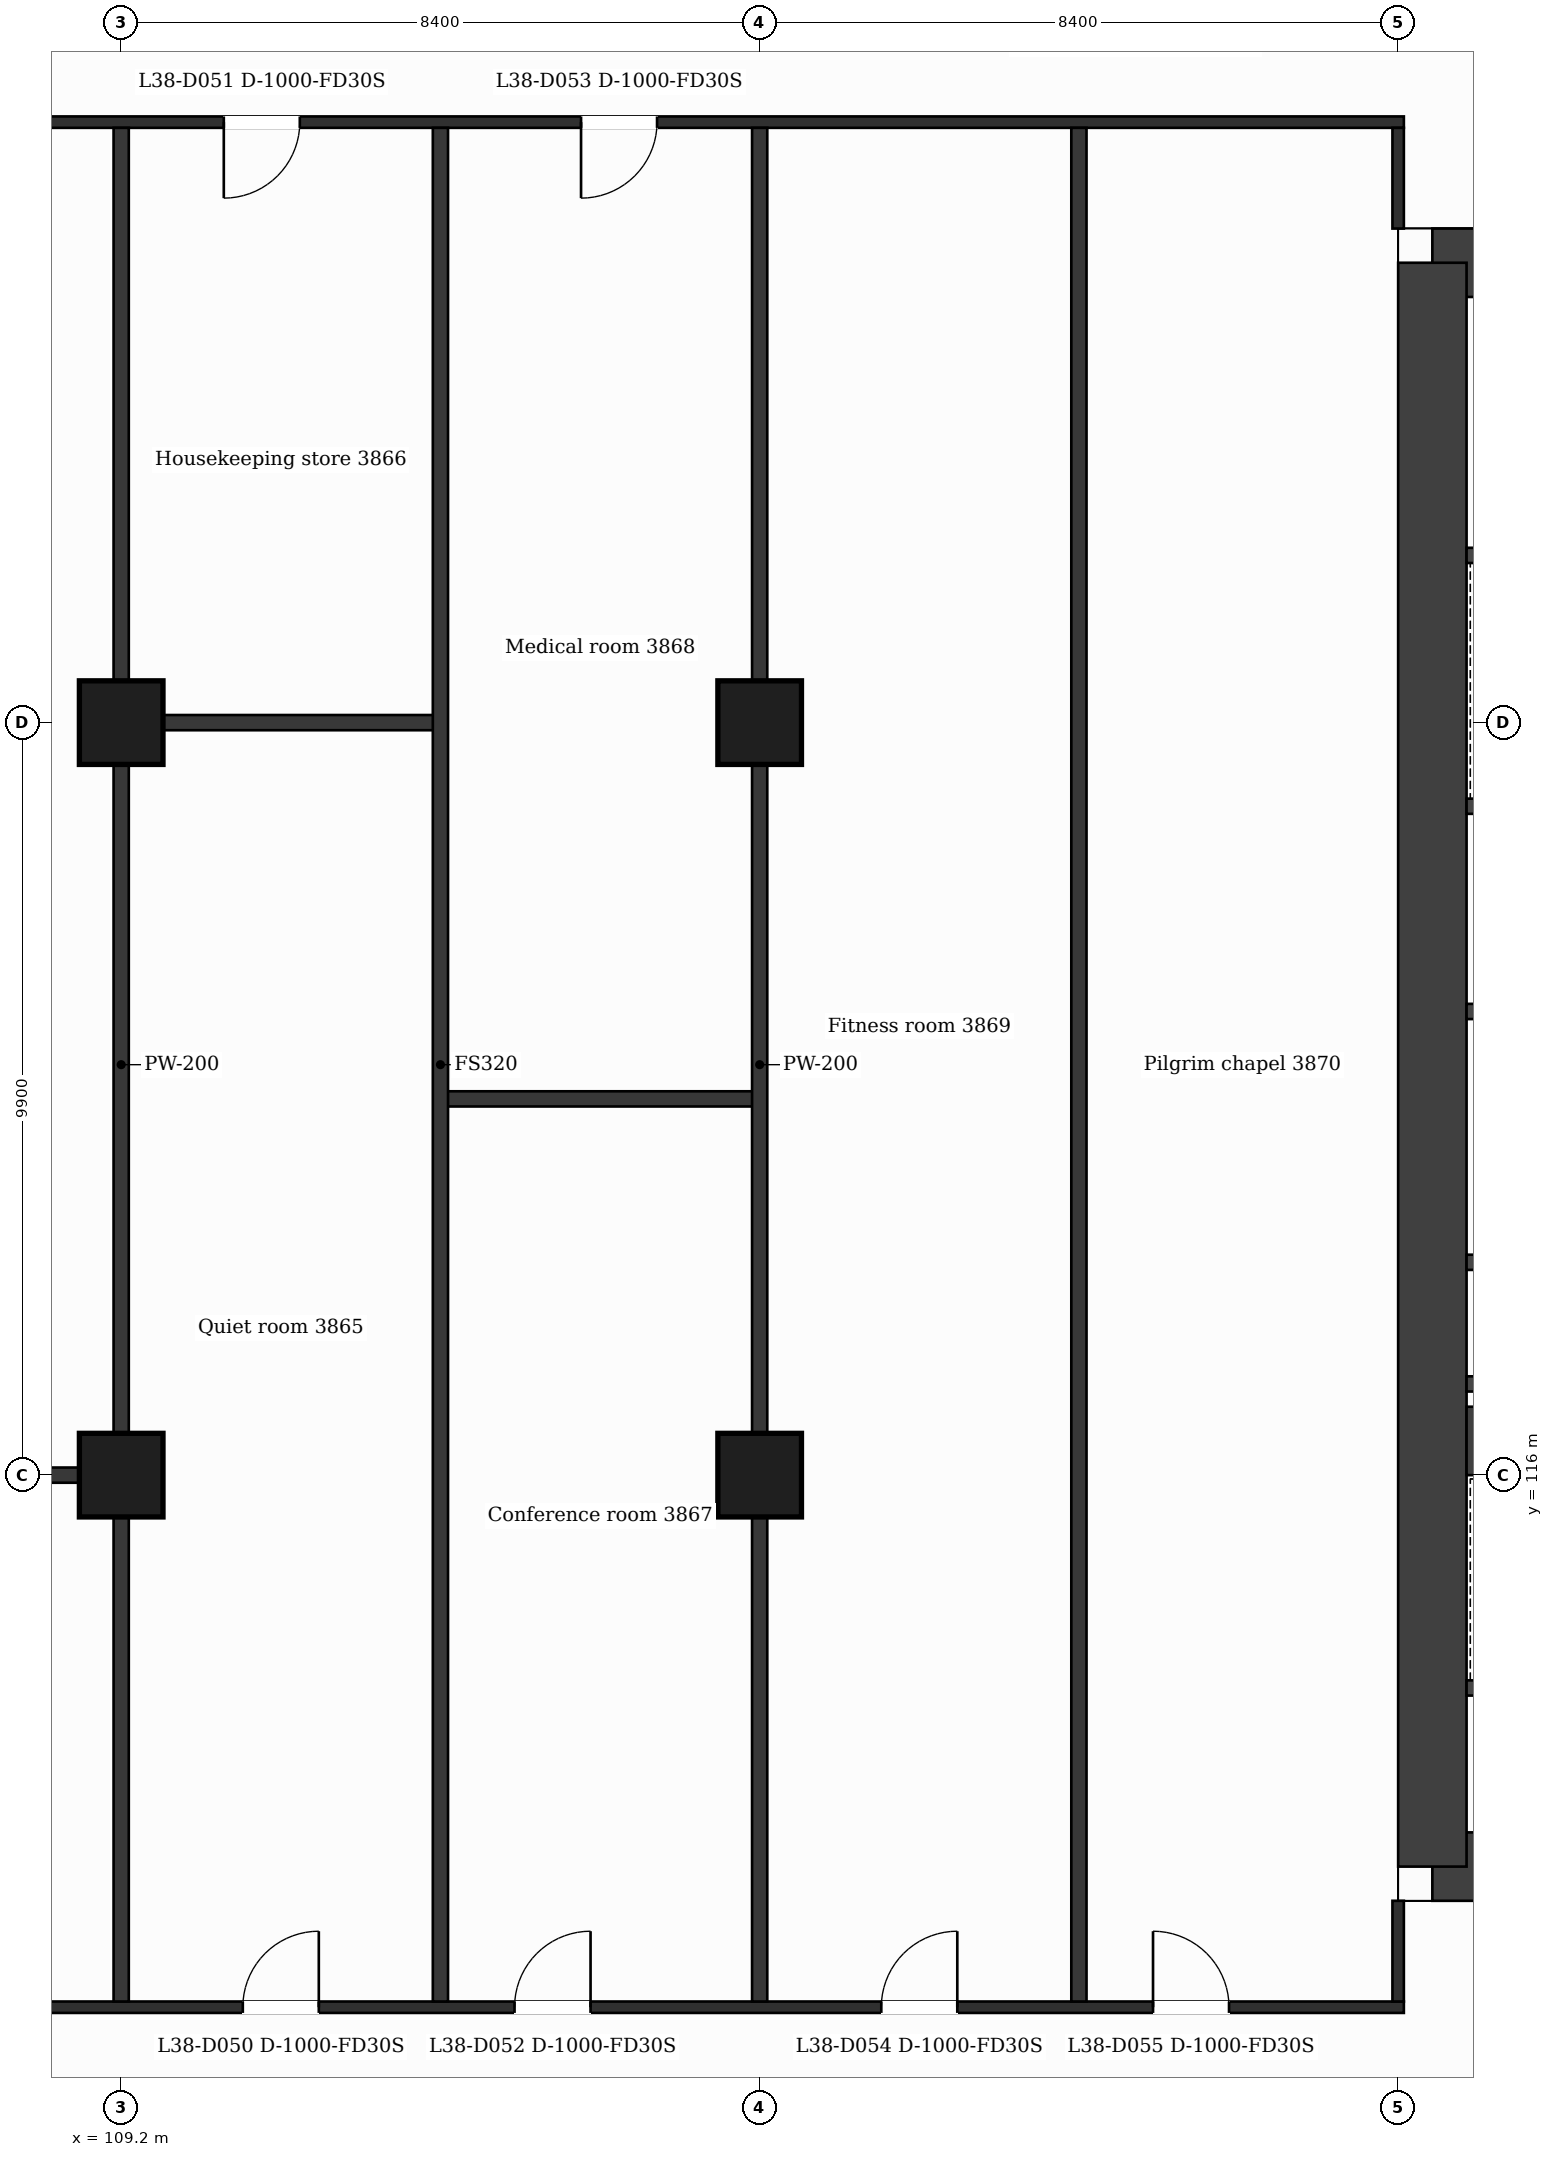
"""IFC4 building model, lengths in metres.
Left out: names, types, materials, properties, quantities, classifications, styles, units other than length and angle.
Written with IfcOpenShell. Run it as: python <this file> out.ifc"""

import sys

from ifc_helpers import new_model, si_unit, direction, frame, frame_2d, origin, origin_2d, place, context, subcontext, project, spatial, rectangle, extrude, element, fill, save


model = new_model("IFC4")
c1 = context("Model", 3, precision=1e-05, world=origin(), true_north=direction((0.0, 1.0)))
c2 = subcontext(c1, "Body", "Model", "MODEL_VIEW")
j1 = project(units=[si_unit("LENGTHUNIT", "METRE"), si_unit("PLANEANGLEUNIT", "RADIAN")], contexts=[c1])
p1 = place(None, origin())
s1 = spatial("IfcSite", under=j1, at=p1, CompositionType="ELEMENT")
p2 = place(p1, origin())
s2 = spatial("IfcBuilding", under=s1, at=p2, CompositionType="ELEMENT")
p3 = place(p2, frame((0.0, 0.0, 162.6)))
s3 = spatial("IfcBuildingStorey", under=s2, at=p3, CompositionType="ELEMENT", Elevation=162.6)
p4 = place(p3, frame((126.45, 131.95, 0.0), z_axis=(0.0, 0.0, 1.0), x_axis=(1.0, 0.0, 0.0)))
e1 = element("IfcWall", 1, at=p4, inside=s3, PredefinedType="SHEAR", context=c2, shape_type="SweptSolid", body=[
    extrude(rectangle(XDim=11.326, YDim=0.9, at=frame_2d((5.663, 0.0))), origin(), (0.0, 0.0, 1.0), 3.7),
])
p5 = place(p4, frame((3.386, 0.0, 0.0)))
e2 = element("IfcOpeningElement", 2, at=p5, cuts=e1, PredefinedType="OPENING", context=c2, shape_type="SweptSolid", body=[
    extrude(rectangle(XDim=1.2, YDim=2.1, at=frame_2d((0.6, 1.05))), frame((0.0, 0.46, 0.0), z_axis=(0.0, -1.0, 0.0), x_axis=(1.0, 0.0, 0.0)), (0.0, 0.0, 1.0), 0.92),
])
p6 = place(p3, frame((140.616, 110.85, 0.0), z_axis=(0.0, 0.0, 1.0), x_axis=(-1.0, 0.0, 0.0)))
e3 = element("IfcWall", 3, at=p6, inside=s3, PredefinedType="SHEAR", context=c2, shape_type="SweptSolid", body=[
    extrude(rectangle(XDim=14.166, YDim=0.9, at=frame_2d((7.083, 0.0))), origin(), (0.0, 0.0, 1.0), 3.7),
])
p7 = place(p6, frame((6.911, 0.0, 0.0)))
e4 = element("IfcOpeningElement", 4, at=p7, cuts=e3, PredefinedType="OPENING", context=c2, shape_type="SweptSolid", body=[
    extrude(rectangle(XDim=1.4, YDim=2.1, at=frame_2d((0.7, 1.05))), frame((0.0, 0.46, 0.0), z_axis=(0.0, -1.0, 0.0), x_axis=(1.0, 0.0, 0.0)), (0.0, 0.0, 1.0), 0.92),
])
p8 = place(p3, frame((126.45, 110.85, 0.0), z_axis=(0.0, 0.0, 1.0), x_axis=(0.0, 1.0, 0.0)))
e5 = element("IfcWall", 5, at=p8, inside=s3, PredefinedType="SHEAR", context=c2, shape_type="SweptSolid", body=[
    extrude(rectangle(XDim=21.1, YDim=0.9, at=frame_2d((10.55, 0.0))), origin(), (0.0, 0.0, 1.0), 3.7),
])
p9 = place(p3, frame((126.9, 116.45, 0.0), z_axis=(0.0, 0.0, 1.0), x_axis=(1.0, 0.0, 0.0)))
e6 = element("IfcWall", 6, at=p9, inside=s3, PredefinedType="SHEAR", context=c2, shape_type="SweptSolid", body=[
    extrude(rectangle(XDim=5.1, YDim=0.9, at=frame_2d((2.55, 0.0))), origin(), (0.0, 0.0, 1.0), 3.7),
])
for number, where, z_axis, x_axis in (
    (7, (109.2, 116.0, 0.0), (0.0, 0.0, 1.0), (1.0, 0.0, 0.0)),
    (8, (117.6, 116.0, 0.0), (0.0, 0.0, 1.0), (1.0, 0.0, 0.0)),
    (9, (109.2, 125.9, 0.0), (0.0, 0.0, 1.0), (1.0, 0.0, 0.0)),
    (10, (117.6, 125.9, 0.0), (0.0, 0.0, 1.0), (1.0, 0.0, 0.0)),
):
    element("IfcColumn", number, at=place(p3, frame(where, z_axis=z_axis, x_axis=x_axis)), inside=s3, PredefinedType="COLUMN", context=c2, shape_type="SweptSolid", body=[
        extrude(rectangle(XDim=1.1, YDim=1.1, at=origin_2d()), origin(), (0.0, 0.0, 1.0), 3.7),
    ])
p10 = place(p3, frame((100.725, 109.0, 0.0), z_axis=(0.0, 0.0, 1.0), x_axis=(1.0, 0.0, 0.0)))
e11 = element("IfcWall", 11, at=p10, inside=s3, PredefinedType="PARTITIONING", context=c2, shape_type="SweptSolid", body=[
    extrude(rectangle(XDim=25.35, YDim=0.15, at=frame_2d((12.675, 0.0))), origin(), (0.0, 0.0, 1.0), 3.38),
])
p11 = place(p10, frame((2.1, 0.0, 0.0)))
e12 = element("IfcOpeningElement", 12, at=p11, cuts=e11, PredefinedType="OPENING", context=c2, shape_type="SweptSolid", body=[
    extrude(rectangle(XDim=1.0, YDim=2.1, at=frame_2d((0.5, 1.05))), frame((0.0, 0.085, 0.0), z_axis=(0.0, -1.0, 0.0), x_axis=(1.0, 0.0, 0.0)), (0.0, 0.0, 1.0), 0.17),
])
p12 = place(p10, frame((10.075, 0.0, 0.0)))
e13 = element("IfcOpeningElement", 13, at=p12, cuts=e11, PredefinedType="OPENING", context=c2, shape_type="SweptSolid", body=[
    extrude(rectangle(XDim=1.0, YDim=2.1, at=frame_2d((0.5, 1.05))), frame((0.0, 0.085, 0.0), z_axis=(0.0, -1.0, 0.0), x_axis=(1.0, 0.0, 0.0)), (0.0, 0.0, 1.0), 0.17),
])
p13 = place(p10, frame((13.65, 0.0, 0.0)))
e14 = element("IfcOpeningElement", 14, at=p13, cuts=e11, PredefinedType="OPENING", context=c2, shape_type="SweptSolid", body=[
    extrude(rectangle(XDim=1.0, YDim=2.1, at=frame_2d((0.5, 1.05))), frame((0.0, 0.085, 0.0), z_axis=(0.0, -1.0, 0.0), x_axis=(1.0, 0.0, 0.0)), (0.0, 0.0, 1.0), 0.17),
])
p14 = place(p10, frame((18.475, 0.0, 0.0)))
e15 = element("IfcOpeningElement", 15, at=p14, cuts=e11, PredefinedType="OPENING", context=c2, shape_type="SweptSolid", body=[
    extrude(rectangle(XDim=1.0, YDim=2.1, at=frame_2d((0.5, 1.05))), frame((0.0, 0.085, 0.0), z_axis=(0.0, -1.0, 0.0), x_axis=(1.0, 0.0, 0.0)), (0.0, 0.0, 1.0), 0.17),
])
p15 = place(p10, frame((22.05, 0.0, 0.0)))
e16 = element("IfcOpeningElement", 16, at=p15, cuts=e11, PredefinedType="OPENING", context=c2, shape_type="SweptSolid", body=[
    extrude(rectangle(XDim=1.0, YDim=2.1, at=frame_2d((0.5, 1.05))), frame((0.0, 0.085, 0.0), z_axis=(0.0, -1.0, 0.0), x_axis=(1.0, 0.0, 0.0)), (0.0, 0.0, 1.0), 0.17),
])
p16 = place(p3, frame((126.9, 113.2, 0.0), z_axis=(0.0, 0.0, 1.0), x_axis=(1.0, 0.0, 0.0)))
e17 = element("IfcWall", 17, at=p16, inside=s3, PredefinedType="PARTITIONING", context=c2, shape_type="SweptSolid", body=[
    extrude(rectangle(XDim=4.773, YDim=0.2, at=frame_2d((2.387, 0.0))), origin(), (0.0, 0.0, 1.0), 3.38),
])
p17 = place(p16, frame((0.565, 0.0, 0.0)))
e18 = element("IfcOpeningElement", 18, at=p17, cuts=e17, PredefinedType="OPENING", context=c2, shape_type="SweptSolid", body=[
    extrude(rectangle(XDim=1.1, YDim=2.1, at=frame_2d((0.55, 1.05))), frame((0.0, 0.11, 0.0), z_axis=(0.0, -1.0, 0.0), x_axis=(1.0, 0.0, 0.0)), (0.0, 0.0, 1.0), 0.22),
])
p18 = place(p3, frame((100.8, 116.0, 0.0), z_axis=(0.0, 0.0, 1.0), x_axis=(1.0, 0.0, 0.0)))
e19 = element("IfcWall", 19, at=p18, inside=s3, PredefinedType="PARTITIONING", context=c2, shape_type="SweptSolid", body=[
    extrude(rectangle(XDim=8.4, YDim=0.2, at=frame_2d((4.2, 0.0))), origin(), (0.0, 0.0, 1.0), 3.38),
])
for number, where, z_axis, x_axis in (
    (20, (126.9, 117.2, 0.0), (0.0, 0.0, 1.0), (1.0, 0.0, 0.0)),
    (21, (126.9, 118.8, 0.0), (0.0, 0.0, 1.0), (1.0, 0.0, 0.0)),
):
    element("IfcWall", number, at=place(p3, frame(where, z_axis=z_axis, x_axis=x_axis)), inside=s3, PredefinedType="PARTITIONING", context=c2, shape_type="SweptSolid", body=[
        extrude(rectangle(XDim=4.673, YDim=0.2, at=frame_2d((2.336, 0.0))), origin(), (0.0, 0.0, 1.0), 3.38),
    ])
p19 = place(p3, frame((113.4, 120.95, 0.0), z_axis=(0.0, 0.0, 1.0), x_axis=(1.0, 0.0, 0.0)))
e22 = element("IfcWall", 22, at=p19, inside=s3, PredefinedType="PARTITIONING", context=c2, shape_type="SweptSolid", body=[
    extrude(rectangle(XDim=4.2, YDim=0.2, at=frame_2d((2.1, 0.0))), origin(), (0.0, 0.0, 1.0), 3.38),
])
p20 = place(p3, frame((126.9, 122.1, 0.0), z_axis=(0.0, 0.0, 1.0), x_axis=(1.0, 0.0, 0.0)))
e23 = element("IfcWall", 23, at=p20, inside=s3, PredefinedType="PARTITIONING", context=c2, shape_type="SweptSolid", body=[
    extrude(rectangle(XDim=4.673, YDim=0.2, at=frame_2d((2.336, 0.0))), origin(), (0.0, 0.0, 1.0), 3.38),
])
p21 = place(p20, frame((3.055, 0.0, 0.0)))
e24 = element("IfcOpeningElement", 24, at=p21, cuts=e23, PredefinedType="OPENING", context=c2, shape_type="SweptSolid", body=[
    extrude(rectangle(XDim=0.9, YDim=2.1, at=frame_2d((0.45, 1.05))), frame((0.0, 0.11, 0.0), z_axis=(0.0, -1.0, 0.0), x_axis=(1.0, 0.0, 0.0)), (0.0, 0.0, 1.0), 0.22),
])
p22 = place(p20, frame((0.902, 0.0, 0.0)))
e25 = element("IfcOpeningElement", 25, at=p22, cuts=e23, PredefinedType="OPENING", context=c2, shape_type="SweptSolid", body=[
    extrude(rectangle(XDim=0.9, YDim=2.1, at=frame_2d((0.45, 1.05))), frame((0.0, 0.11, 0.0), z_axis=(0.0, -1.0, 0.0), x_axis=(1.0, 0.0, 0.0)), (0.0, 0.0, 1.0), 0.22),
])
p23 = place(p3, frame((126.9, 124.8, 0.0), z_axis=(0.0, 0.0, 1.0), x_axis=(1.0, 0.0, 0.0)))
e26 = element("IfcWall", 26, at=p23, inside=s3, PredefinedType="PARTITIONING", context=c2, shape_type="SweptSolid", body=[
    extrude(rectangle(XDim=4.715, YDim=0.2, at=frame_2d((2.358, 0.0))), origin(), (0.0, 0.0, 1.0), 3.38),
])
p24 = place(p23, frame((0.629, 0.0, 0.0)))
e27 = element("IfcOpeningElement", 27, at=p24, cuts=e26, PredefinedType="OPENING", context=c2, shape_type="SweptSolid", body=[
    extrude(rectangle(XDim=1.1, YDim=2.1, at=frame_2d((0.55, 1.05))), frame((0.0, 0.11, 0.0), z_axis=(0.0, -1.0, 0.0), x_axis=(1.0, 0.0, 0.0)), (0.0, 0.0, 1.0), 0.22),
])
p25 = place(p3, frame((109.2, 125.9, 0.0), z_axis=(0.0, 0.0, 1.0), x_axis=(1.0, 0.0, 0.0)))
e28 = element("IfcWall", 28, at=p25, inside=s3, PredefinedType="PARTITIONING", context=c2, shape_type="SweptSolid", body=[
    extrude(rectangle(XDim=4.2, YDim=0.2, at=frame_2d((2.1, 0.0))), origin(), (0.0, 0.0, 1.0), 3.38),
])
p26 = place(p3, frame((126.9, 128.1, 0.0), z_axis=(0.0, 0.0, 1.0), x_axis=(1.0, 0.0, 0.0)))
e29 = element("IfcWall", 29, at=p26, inside=s3, PredefinedType="PARTITIONING", context=c2, shape_type="SweptSolid", body=[
    extrude(rectangle(XDim=4.715, YDim=0.2, at=frame_2d((2.358, 0.0))), origin(), (0.0, 0.0, 1.0), 3.38),
])
p27 = place(p26, frame((3.126, 0.0, 0.0)))
e30 = element("IfcOpeningElement", 30, at=p27, cuts=e29, PredefinedType="OPENING", context=c2, shape_type="SweptSolid", body=[
    extrude(rectangle(XDim=1.1, YDim=2.1, at=frame_2d((0.55, 1.05))), frame((0.0, 0.11, 0.0), z_axis=(0.0, -1.0, 0.0), x_axis=(1.0, 0.0, 0.0)), (0.0, 0.0, 1.0), 0.22),
])
p28 = place(p3, frame((100.725, 133.8, 0.0), z_axis=(0.0, 0.0, 1.0), x_axis=(1.0, 0.0, 0.0)))
e31 = element("IfcWall", 31, at=p28, inside=s3, PredefinedType="PARTITIONING", context=c2, shape_type="SweptSolid", body=[
    extrude(rectangle(XDim=25.35, YDim=0.15, at=frame_2d((12.675, 0.0))), origin(), (0.0, 0.0, 1.0), 3.38),
])
p29 = place(p28, frame((2.1, 0.0, 0.0)))
e32 = element("IfcOpeningElement", 32, at=p29, cuts=e31, PredefinedType="OPENING", context=c2, shape_type="SweptSolid", body=[
    extrude(rectangle(XDim=1.0, YDim=2.1, at=frame_2d((0.5, 1.05))), frame((0.0, 0.085, 0.0), z_axis=(0.0, -1.0, 0.0), x_axis=(1.0, 0.0, 0.0)), (0.0, 0.0, 1.0), 0.17),
])
p30 = place(p28, frame((9.825, 0.0, 0.0)))
e33 = element("IfcOpeningElement", 33, at=p30, cuts=e31, PredefinedType="OPENING", context=c2, shape_type="SweptSolid", body=[
    extrude(rectangle(XDim=1.0, YDim=2.1, at=frame_2d((0.5, 1.05))), frame((0.0, 0.085, 0.0), z_axis=(0.0, -1.0, 0.0), x_axis=(1.0, 0.0, 0.0)), (0.0, 0.0, 1.0), 0.17),
])
p31 = place(p28, frame((14.525, 0.0, 0.0)))
e34 = element("IfcOpeningElement", 34, at=p31, cuts=e31, PredefinedType="OPENING", context=c2, shape_type="SweptSolid", body=[
    extrude(rectangle(XDim=1.0, YDim=2.1, at=frame_2d((0.5, 1.05))), frame((0.0, 0.085, 0.0), z_axis=(0.0, -1.0, 0.0), x_axis=(1.0, 0.0, 0.0)), (0.0, 0.0, 1.0), 0.17),
])
for number, where, z_axis, x_axis in (
    (35, (109.2, 109.075, 0.0), (0.0, 0.0, 1.0), (0.0, 1.0, 0.0)),
    (36, (113.4, 109.075, 0.0), (0.0, 0.0, 1.0), (0.0, 1.0, 0.0)),
    (37, (117.6, 109.075, 0.0), (0.0, 0.0, 1.0), (0.0, 1.0, 0.0)),
    (38, (121.8, 109.075, 0.0), (0.0, 0.0, 1.0), (0.0, 1.0, 0.0)),
):
    element("IfcWall", number, at=place(p3, frame(where, z_axis=z_axis, x_axis=x_axis)), inside=s3, PredefinedType="PARTITIONING", context=c2, shape_type="SweptSolid", body=[
        extrude(rectangle(XDim=24.65, YDim=0.2, at=frame_2d((12.325, 0.0))), origin(), (0.0, 0.0, 1.0), 3.38),
    ])
p32 = place(p3, frame((126.0, 109.075, 0.0), z_axis=(0.0, 0.0, 1.0), x_axis=(0.0, 1.0, 0.0)))
e39 = element("IfcWall", 39, at=p32, inside=s3, PredefinedType="PARTITIONING", context=c2, shape_type="SweptSolid", body=[
    extrude(rectangle(XDim=1.325, YDim=0.15, at=frame_2d((0.663, 0.0))), origin(), (0.0, 0.0, 1.0), 3.38),
])
p33 = place(p3, frame((126.0, 132.4, 0.0), z_axis=(0.0, 0.0, 1.0), x_axis=(0.0, 1.0, 0.0)))
e40 = element("IfcWall", 40, at=p33, inside=s3, PredefinedType="PARTITIONING", context=c2, shape_type="SweptSolid", body=[
    extrude(rectangle(XDim=1.325, YDim=0.15, at=frame_2d((0.663, 0.0))), origin(), (0.0, 0.0, 1.0), 3.38),
])
p34 = place(p12, origin())
e41 = element("IfcDoor", 41, at=p34, inside=s3, OperationType="SINGLE_SWING_RIGHT", PredefinedType="DOOR", context=c2, shape_type="SweptSolid", body=[
    extrude(rectangle(XDim=1.0, YDim=2.1, at=frame_2d((0.5, 1.05))), frame((0.0, 0.025, 0.0), z_axis=(0.0, -1.0, 0.0), x_axis=(1.0, 0.0, 0.0)), (0.0, 0.0, 1.0), 0.05),
])
fill(e13, e41)
p35 = place(p30, origin())
e42 = element("IfcDoor", 42, at=p35, inside=s3, OperationType="SINGLE_SWING_LEFT", PredefinedType="DOOR", context=c2, shape_type="SweptSolid", body=[
    extrude(rectangle(XDim=1.0, YDim=2.1, at=frame_2d((0.5, 1.05))), frame((0.0, 0.025, 0.0), z_axis=(0.0, -1.0, 0.0), x_axis=(1.0, 0.0, 0.0)), (0.0, 0.0, 1.0), 0.05),
])
fill(e33, e42)
p36 = place(p13, origin())
e43 = element("IfcDoor", 43, at=p36, inside=s3, OperationType="SINGLE_SWING_RIGHT", PredefinedType="DOOR", context=c2, shape_type="SweptSolid", body=[
    extrude(rectangle(XDim=1.0, YDim=2.1, at=frame_2d((0.5, 1.05))), frame((0.0, 0.025, 0.0), z_axis=(0.0, -1.0, 0.0), x_axis=(1.0, 0.0, 0.0)), (0.0, 0.0, 1.0), 0.05),
])
fill(e14, e43)
p37 = place(p31, origin())
e44 = element("IfcDoor", 44, at=p37, inside=s3, OperationType="SINGLE_SWING_LEFT", PredefinedType="DOOR", context=c2, shape_type="SweptSolid", body=[
    extrude(rectangle(XDim=1.0, YDim=2.1, at=frame_2d((0.5, 1.05))), frame((0.0, 0.025, 0.0), z_axis=(0.0, -1.0, 0.0), x_axis=(1.0, 0.0, 0.0)), (0.0, 0.0, 1.0), 0.05),
])
fill(e34, e44)
p38 = place(p14, origin())
e45 = element("IfcDoor", 45, at=p38, inside=s3, OperationType="SINGLE_SWING_RIGHT", PredefinedType="DOOR", context=c2, shape_type="SweptSolid", body=[
    extrude(rectangle(XDim=1.0, YDim=2.1, at=frame_2d((0.5, 1.05))), frame((0.0, 0.025, 0.0), z_axis=(0.0, -1.0, 0.0), x_axis=(1.0, 0.0, 0.0)), (0.0, 0.0, 1.0), 0.05),
])
fill(e15, e45)
p39 = place(p15, origin())
e46 = element("IfcDoor", 46, at=p39, inside=s3, OperationType="SINGLE_SWING_LEFT", PredefinedType="DOOR", context=c2, shape_type="SweptSolid", body=[
    extrude(rectangle(XDim=1.0, YDim=2.1, at=frame_2d((0.5, 1.05))), frame((0.0, 0.025, 0.0), z_axis=(0.0, -1.0, 0.0), x_axis=(1.0, 0.0, 0.0)), (0.0, 0.0, 1.0), 0.05),
])
fill(e16, e46)
save(model, sys.argv[1])
